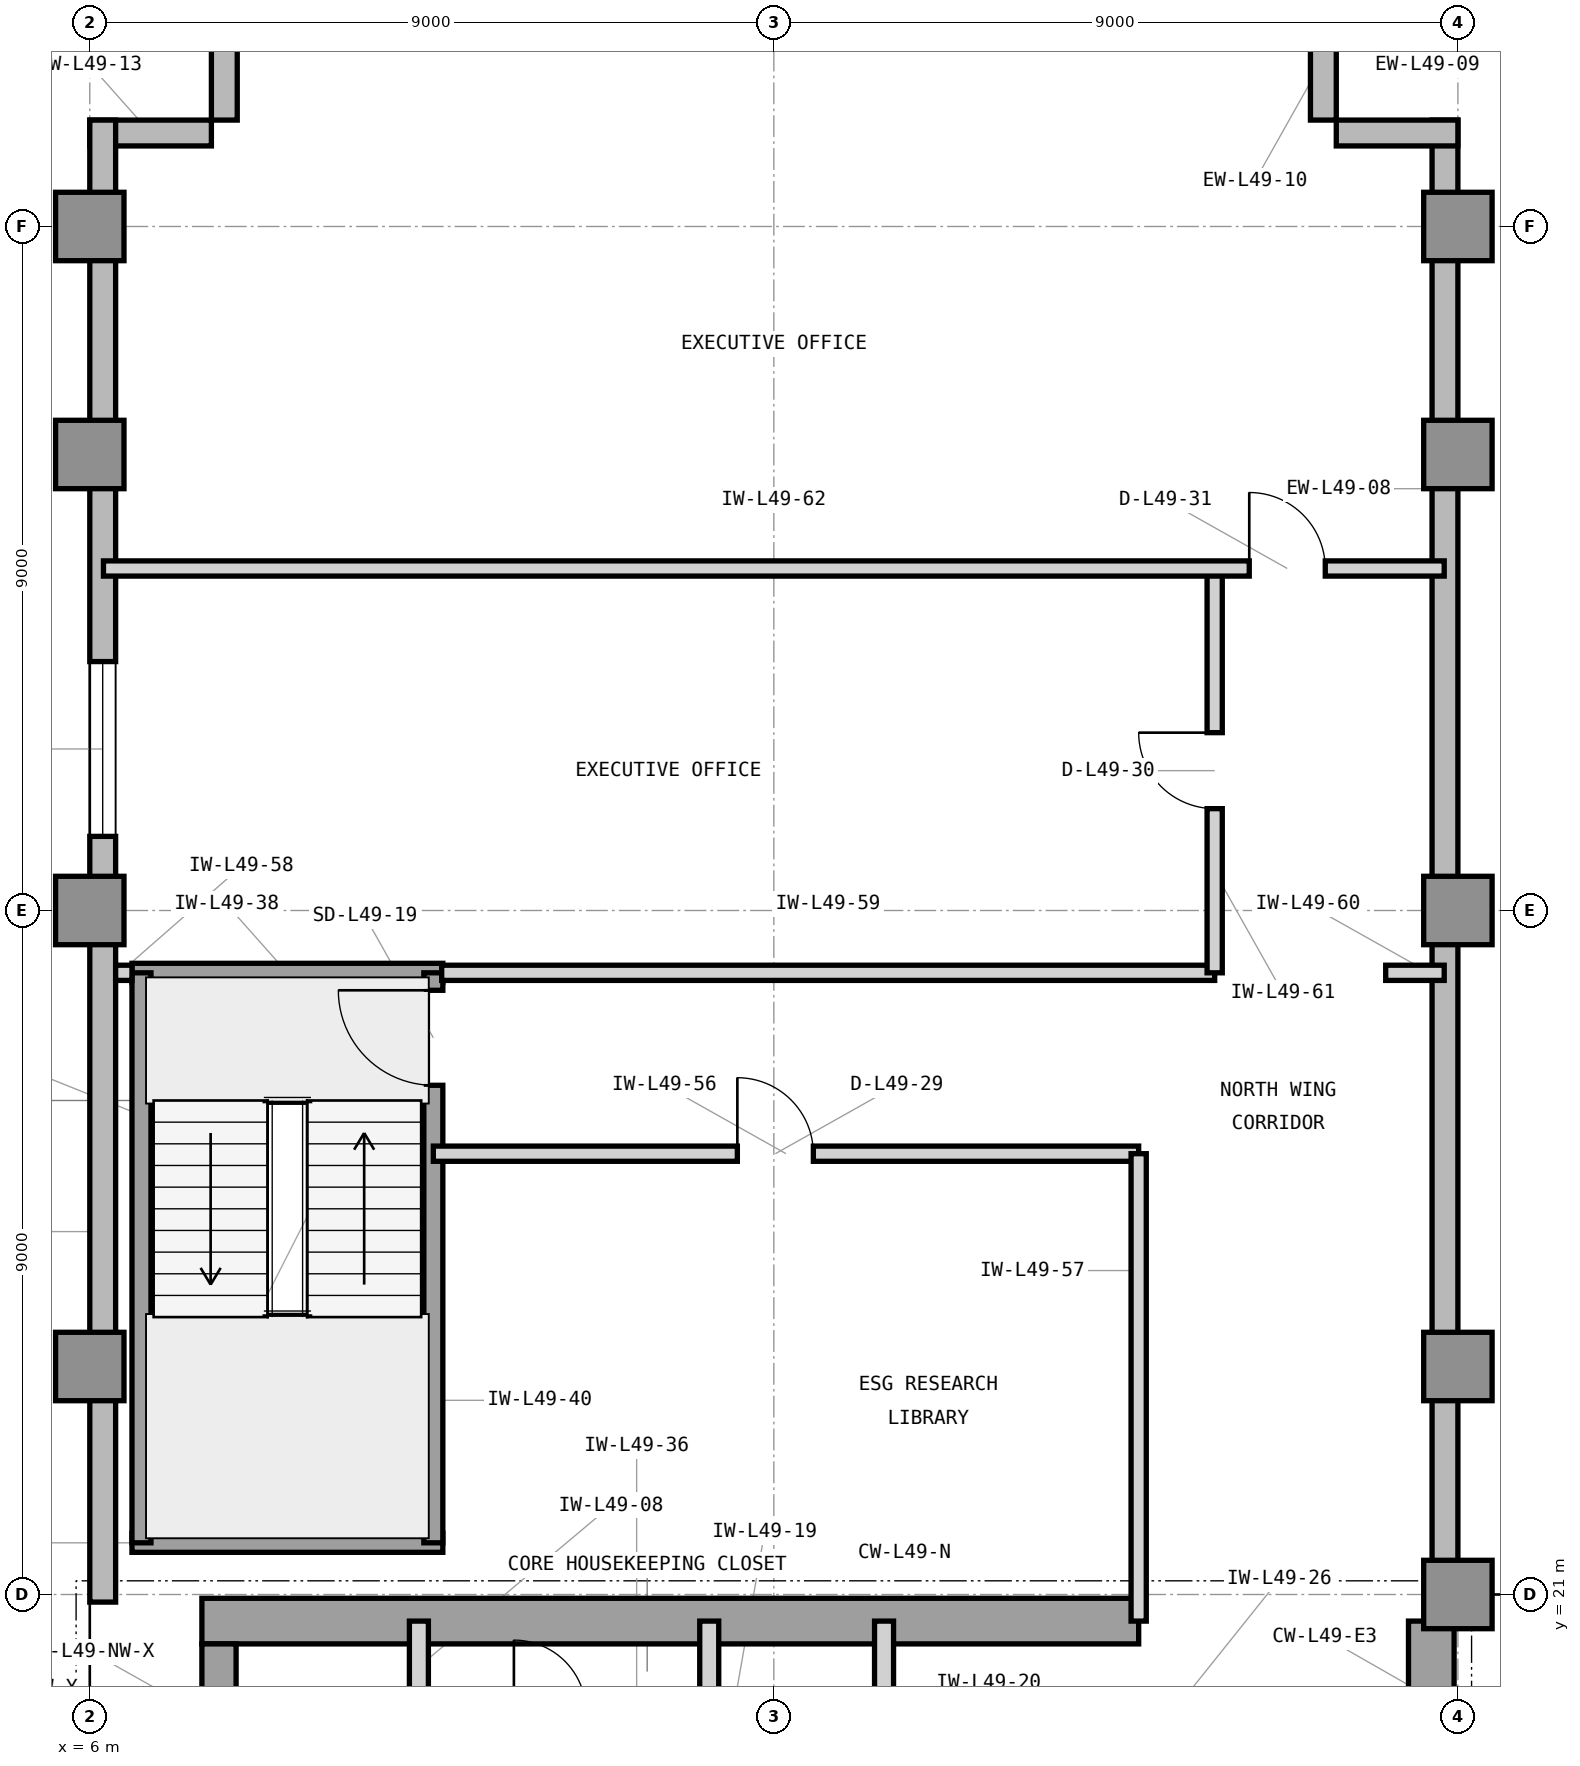
"""IFC4 building model, lengths in metres.
Left out: names, types, materials, properties, quantities, classifications, styles, units other than length and angle.
Written with IfcOpenShell. Run it as: python <this file> out.ifc"""

import sys

from ifc_helpers import new_model, si_unit, direction, frame, frame_2d, origin, origin_2d, place, context, subcontext, project, spatial, rectangle, extrude, element, fill, save


model = new_model("IFC4")
c1 = context("Model", 3, precision=1e-05, world=origin(), true_north=direction((0.0, 1.0)))
c2 = subcontext(c1, "Body", "Model", "MODEL_VIEW")
j1 = project(units=[si_unit("LENGTHUNIT", "METRE"), si_unit("PLANEANGLEUNIT", "RADIAN")], contexts=[c1])
p1 = place(None, origin())
s1 = spatial("IfcSite", under=j1, at=p1, CompositionType="ELEMENT")
p2 = place(p1, origin())
s2 = spatial("IfcBuilding", under=s1, at=p2, CompositionType="ELEMENT")
p3 = place(p2, frame((0.0, 0.0, 203.4)))
s3 = spatial("IfcBuildingStorey", under=s2, at=p3, CompositionType="ELEMENT", Elevation=203.4)
p4 = place(p3, frame((7.475, 20.65, 0.0), z_axis=(0.0, 0.0, 1.0), x_axis=(1.0, 0.0, 0.0)))
e1 = element("IfcWall", 1, at=p4, inside=s3, PredefinedType="SHEAR", context=c2, shape_type="SweptSolid", body=[
    extrude(rectangle(XDim=12.325, YDim=0.6, at=frame_2d((6.163, 0.0))), origin(), (0.0, 0.0, 1.0), 3.9),
])
p5 = place(p3, frame((23.65, 16.6, 0.0), z_axis=(0.0, 0.0, 1.0), x_axis=(0.0, 1.0, 0.0)))
e2 = element("IfcWall", 2, at=p5, inside=s3, PredefinedType="SHEAR", context=c2, shape_type="SweptSolid", body=[
    extrude(rectangle(XDim=4.05, YDim=0.6, at=frame_2d((2.025, 0.0))), origin(), (0.0, 0.0, 1.0), 3.9),
])
p6 = place(p3, frame((7.7, 19.575, 0.0), z_axis=(0.0, 0.0, 1.0), x_axis=(0.0, 1.0, 0.0)))
e3 = element("IfcWall", 3, at=p6, inside=s3, PredefinedType="SHEAR", context=c2, shape_type="SweptSolid", body=[
    extrude(rectangle(XDim=0.775, YDim=0.45, at=frame_2d((0.388, 0.0))), origin(), (0.0, 0.0, 1.0), 3.9),
])
for number, where, z_axis, x_axis in (
    (4, (24.0, 21.0, 0.0), (0.0, 0.0, 1.0), (1.0, 0.0, 0.0)),
    (5, (6.0, 24.0, 0.0), (0.0, 0.0, 1.0), (1.0, 0.0, 0.0)),
    (6, (24.0, 24.0, 0.0), (0.0, 0.0, 1.0), (1.0, 0.0, 0.0)),
    (7, (6.0, 30.0, 0.0), (0.0, 0.0, 1.0), (1.0, 0.0, 0.0)),
    (8, (24.0, 30.0, 0.0), (0.0, 0.0, 1.0), (1.0, 0.0, 0.0)),
    (9, (6.0, 36.0, 0.0), (0.0, 0.0, 1.0), (1.0, 0.0, 0.0)),
    (10, (24.0, 36.0, 0.0), (0.0, 0.0, 1.0), (1.0, 0.0, 0.0)),
    (11, (6.0, 39.0, 0.0), (0.0, 0.0, 1.0), (1.0, 0.0, 0.0)),
    (12, (24.0, 39.0, 0.0), (0.0, 0.0, 1.0), (1.0, 0.0, 0.0)),
):
    element("IfcColumn", number, at=place(p3, frame(where, z_axis=z_axis, x_axis=x_axis)), inside=s3, PredefinedType="COLUMN", context=c2, shape_type="SweptSolid", body=[
        extrude(rectangle(XDim=0.9, YDim=0.9, at=origin_2d()), origin(), (0.0, 0.0, 1.0), 3.9),
    ])
p7 = place(p3, frame((23.83, 21.0, 0.0), z_axis=(0.0, 0.0, 1.0), x_axis=(0.0, 1.0, 0.0)))
e13 = element("IfcWall", 13, at=p7, inside=s3, PredefinedType="STANDARD", context=c2, shape_type="SweptSolid", body=[
    extrude(rectangle(XDim=19.4, YDim=0.34, at=frame_2d((9.7, 0.0))), origin(), (0.0, 0.0, 1.0), 3.7),
])
for number, where, z_axis, x_axis in (
    (14, (24.0, 40.23, 0.0), (0.0, 0.0, 1.0), (-1.0, 0.0, 0.0)),
    (15, (22.23, 40.4, 0.0), (0.0, 0.0, 1.0), (0.0, 1.0, 0.0)),
    (16, (7.77, 42.0, 0.0), (0.0, 0.0, 1.0), (0.0, -1.0, 0.0)),
    (17, (7.6, 40.23, 0.0), (0.0, 0.0, 1.0), (-1.0, 0.0, 0.0)),
):
    element("IfcWall", number, at=place(p3, frame(where, z_axis=z_axis, x_axis=x_axis)), inside=s3, PredefinedType="STANDARD", context=c2, shape_type="SweptSolid", body=[
        extrude(rectangle(XDim=1.6, YDim=0.34, at=frame_2d((0.8, 0.0))), origin(), (0.0, 0.0, 1.0), 3.7),
    ])
p8 = place(p3, frame((6.17, 40.4, 0.0), z_axis=(0.0, 0.0, 1.0), x_axis=(0.0, -1.0, 0.0)))
e18 = element("IfcWall", 18, at=p8, inside=s3, PredefinedType="STANDARD", context=c2, shape_type="SweptSolid", body=[
    extrude(rectangle(XDim=19.5, YDim=0.34, at=frame_2d((9.75, 0.0))), origin(), (0.0, 0.0, 1.0), 3.7),
])
p9 = place(p8, frame((7.125, 0.0, 0.9)))
e19 = element("IfcOpeningElement", 19, at=p9, cuts=e18, PredefinedType="OPENING", context=c2, shape_type="SweptSolid", body=[
    extrude(rectangle(XDim=2.3, YDim=2.2, at=frame_2d((1.15, 1.1))), frame((0.0, 0.18, 0.0), z_axis=(0.0, -1.0, 0.0), x_axis=(1.0, 0.0, 0.0)), (0.0, 0.0, 1.0), 0.36),
])
p10 = place(p3, frame((10.33, 19.45, 0.0), z_axis=(0.0, 0.0, 1.0), x_axis=(0.0, 1.0, 0.0)))
e20 = element("IfcWall", 20, at=p10, inside=s3, PredefinedType="PARTITIONING", context=c2, shape_type="SweptSolid", body=[
    extrude(rectangle(XDim=1.2, YDim=0.25, at=frame_2d((0.6, 0.0))), origin(), (0.0, 0.0, 1.0), 3.69),
])
for number, where, z_axis, x_axis in (
    (21, (14.15, 16.7, 0.0), (0.0, 0.0, 1.0), (0.0, 1.0, 0.0)),
    (22, (16.45, 16.7, 0.0), (0.0, 0.0, 1.0), (0.0, 1.0, 0.0)),
):
    element("IfcWall", number, at=place(p3, frame(where, z_axis=z_axis, x_axis=x_axis)), inside=s3, PredefinedType="PARTITIONING", context=c2, shape_type="SweptSolid", body=[
        extrude(rectangle(XDim=3.95, YDim=0.25, at=frame_2d((1.975, 0.0))), origin(), (0.0, 0.0, 1.0), 3.69),
    ])
for number, where, z_axis, x_axis in (
    (23, (6.555, 21.68, 0.0), (0.0, 0.0, 1.0), (1.0, 0.0, 0.0)),
    (24, (6.555, 29.18, 0.0), (0.0, 0.0, 1.0), (1.0, 0.0, 0.0)),
):
    element("IfcWall", number, at=place(p3, frame(where, z_axis=z_axis, x_axis=x_axis)), inside=s3, PredefinedType="SHEAR", context=c2, shape_type="SweptSolid", body=[
        extrude(rectangle(XDim=4.09, YDim=0.25, at=frame_2d((2.045, 0.0))), origin(), (0.0, 0.0, 1.0), 3.9),
    ])
p11 = place(p3, frame((6.68, 21.68, 0.0), z_axis=(0.0, 0.0, 1.0), x_axis=(0.0, 1.0, 0.0)))
e25 = element("IfcWall", 25, at=p11, inside=s3, PredefinedType="SHEAR", context=c2, shape_type="SweptSolid", body=[
    extrude(rectangle(XDim=7.5, YDim=0.25, at=frame_2d((3.75, 0.0))), origin(), (0.0, 0.0, 1.0), 3.9),
])
p12 = place(p3, frame((10.52, 21.68, 0.0), z_axis=(0.0, 0.0, 1.0), x_axis=(0.0, 1.0, 0.0)))
e26 = element("IfcWall", 26, at=p12, inside=s3, PredefinedType="SHEAR", context=c2, shape_type="SweptSolid", body=[
    extrude(rectangle(XDim=7.5, YDim=0.25, at=frame_2d((3.75, 0.0))), origin(), (0.0, 0.0, 1.0), 3.9),
])
p13 = place(p12, frame((6.02, 0.0, 0.0)))
e27 = element("IfcOpeningElement", 27, at=p13, cuts=e26, PredefinedType="OPENING", context=c2, shape_type="SweptSolid", body=[
    extrude(rectangle(XDim=1.25, YDim=2.2, at=frame_2d((0.625, 1.1))), frame((0.0, 0.135, 0.0), z_axis=(0.0, -1.0, 0.0), x_axis=(1.0, 0.0, 0.0)), (0.0, 0.0, 1.0), 0.27),
])
p14 = place(p3, frame((10.52, 26.8, 0.0), z_axis=(0.0, 0.0, 1.0), x_axis=(1.0, 0.0, 0.0)))
e28 = element("IfcWall", 28, at=p14, inside=s3, PredefinedType="PARTITIONING", context=c2, shape_type="SweptSolid", body=[
    extrude(rectangle(XDim=9.28, YDim=0.2, at=frame_2d((4.64, 0.0))), origin(), (0.0, 0.0, 1.0), 3.69),
])
p15 = place(p14, frame((4.0, 0.0, 0.0)))
e29 = element("IfcOpeningElement", 29, at=p15, cuts=e28, PredefinedType="OPENING", context=c2, shape_type="SweptSolid", body=[
    extrude(rectangle(XDim=1.0, YDim=2.15, at=frame_2d((0.5, 1.075))), frame((0.0, 0.11, 0.0), z_axis=(0.0, -1.0, 0.0), x_axis=(1.0, 0.0, 0.0)), (0.0, 0.0, 1.0), 0.22),
])
p16 = place(p3, frame((19.8, 20.65, 0.0), z_axis=(0.0, 0.0, 1.0), x_axis=(0.0, 1.0, 0.0)))
e30 = element("IfcWall", 30, at=p16, inside=s3, PredefinedType="PARTITIONING", context=c2, shape_type="SweptSolid", body=[
    extrude(rectangle(XDim=6.15, YDim=0.2, at=frame_2d((3.075, 0.0))), origin(), (0.0, 0.0, 1.0), 3.69),
])
p17 = place(p3, frame((6.34, 29.18, 0.0), z_axis=(0.0, 0.0, 1.0), x_axis=(1.0, 0.0, 0.0)))
e31 = element("IfcWall", 31, at=p17, inside=s3, PredefinedType="PARTITIONING", context=c2, shape_type="SweptSolid", body=[
    extrude(rectangle(XDim=0.215, YDim=0.2, at=frame_2d((0.107, 0.0))), origin(), (0.0, 0.0, 1.0), 3.69),
])
p18 = place(p3, frame((10.63, 29.18, 0.0), z_axis=(0.0, 0.0, 1.0), x_axis=(1.0, 0.0, 0.0)))
e32 = element("IfcWall", 32, at=p18, inside=s3, PredefinedType="PARTITIONING", context=c2, shape_type="SweptSolid", body=[
    extrude(rectangle(XDim=10.17, YDim=0.2, at=frame_2d((5.085, 0.0))), origin(), (0.0, 0.0, 1.0), 3.69),
])
p19 = place(p3, frame((23.05, 29.18, 0.0), z_axis=(0.0, 0.0, 1.0), x_axis=(1.0, 0.0, 0.0)))
e33 = element("IfcWall", 33, at=p19, inside=s3, PredefinedType="PARTITIONING", context=c2, shape_type="SweptSolid", body=[
    extrude(rectangle(XDim=0.77, YDim=0.2, at=frame_2d((0.385, 0.0))), origin(), (0.0, 0.0, 1.0), 3.69),
])
p20 = place(p3, frame((20.8, 29.18, 0.0), z_axis=(0.0, 0.0, 1.0), x_axis=(0.0, 1.0, 0.0)))
e34 = element("IfcWall", 34, at=p20, inside=s3, PredefinedType="PARTITIONING", context=c2, shape_type="SweptSolid", body=[
    extrude(rectangle(XDim=5.32, YDim=0.2, at=frame_2d((2.66, 0.0))), origin(), (0.0, 0.0, 1.0), 3.69),
])
p21 = place(p20, frame((2.16, 0.0, 0.0)))
e35 = element("IfcOpeningElement", 35, at=p21, cuts=e34, PredefinedType="OPENING", context=c2, shape_type="SweptSolid", body=[
    extrude(rectangle(XDim=1.0, YDim=2.15, at=frame_2d((0.5, 1.075))), frame((0.0, 0.11, 0.0), z_axis=(0.0, -1.0, 0.0), x_axis=(1.0, 0.0, 0.0)), (0.0, 0.0, 1.0), 0.22),
])
p22 = place(p3, frame((6.18, 34.5, 0.0), z_axis=(0.0, 0.0, 1.0), x_axis=(1.0, 0.0, 0.0)))
e36 = element("IfcWall", 36, at=p22, inside=s3, PredefinedType="PARTITIONING", context=c2, shape_type="SweptSolid", body=[
    extrude(rectangle(XDim=17.64, YDim=0.2, at=frame_2d((8.82, 0.0))), origin(), (0.0, 0.0, 1.0), 3.69),
])
p23 = place(p22, frame((15.075, 0.0, 0.0)))
e37 = element("IfcOpeningElement", 37, at=p23, cuts=e36, PredefinedType="OPENING", context=c2, shape_type="SweptSolid", body=[
    extrude(rectangle(XDim=1.0, YDim=2.15, at=frame_2d((0.5, 1.075))), frame((0.0, 0.11, 0.0), z_axis=(0.0, -1.0, 0.0), x_axis=(1.0, 0.0, 0.0)), (0.0, 0.0, 1.0), 0.22),
])
p24 = place(p13, origin())
e38 = element("IfcDoor", 38, at=p24, inside=s3, OperationType="SINGLE_SWING_RIGHT", PredefinedType="DOOR", context=c2, shape_type="SweptSolid", body=[
    extrude(rectangle(XDim=1.25, YDim=2.2, at=frame_2d((0.625, 1.1))), frame((0.0, 0.025, 0.0), z_axis=(0.0, -1.0, 0.0), x_axis=(1.0, 0.0, 0.0)), (0.0, 0.0, 1.0), 0.05),
])
fill(e27, e38)
p25 = place(p15, origin())
e39 = element("IfcDoor", 39, at=p25, inside=s3, OperationType="SINGLE_SWING_LEFT", PredefinedType="DOOR", context=c2, shape_type="SweptSolid", body=[
    extrude(rectangle(XDim=1.0, YDim=2.15, at=frame_2d((0.5, 1.075))), frame((0.0, 0.025, 0.0), z_axis=(0.0, -1.0, 0.0), x_axis=(1.0, 0.0, 0.0)), (0.0, 0.0, 1.0), 0.05),
])
fill(e29, e39)
p26 = place(p21, origin())
e40 = element("IfcDoor", 40, at=p26, inside=s3, OperationType="SINGLE_SWING_RIGHT", PredefinedType="DOOR", context=c2, shape_type="SweptSolid", body=[
    extrude(rectangle(XDim=1.0, YDim=2.15, at=frame_2d((0.5, 1.075))), frame((0.0, 0.025, 0.0), z_axis=(0.0, -1.0, 0.0), x_axis=(1.0, 0.0, 0.0)), (0.0, 0.0, 1.0), 0.05),
])
fill(e35, e40)
p27 = place(p23, origin())
e41 = element("IfcDoor", 41, at=p27, inside=s3, OperationType="SINGLE_SWING_LEFT", PredefinedType="DOOR", context=c2, shape_type="SweptSolid", body=[
    extrude(rectangle(XDim=1.0, YDim=2.15, at=frame_2d((0.5, 1.075))), frame((0.0, 0.025, 0.0), z_axis=(0.0, -1.0, 0.0), x_axis=(1.0, 0.0, 0.0)), (0.0, 0.0, 1.0), 0.05),
])
fill(e37, e41)
p28 = place(p9, origin())
e42 = element("IfcWindow", 42, at=p28, inside=s3, PartitioningType="SINGLE_PANEL", PredefinedType="WINDOW", context=c2, shape_type="SweptSolid", body=[
    extrude(rectangle(XDim=2.3, YDim=2.2, at=frame_2d((1.15, 1.1))), frame((0.0, 0.11, 0.0), z_axis=(0.0, -1.0, 0.0), x_axis=(1.0, 0.0, 0.0)), (0.0, 0.0, 1.0), 0.06),
])
fill(e19, e42)
save(model, sys.argv[1])
